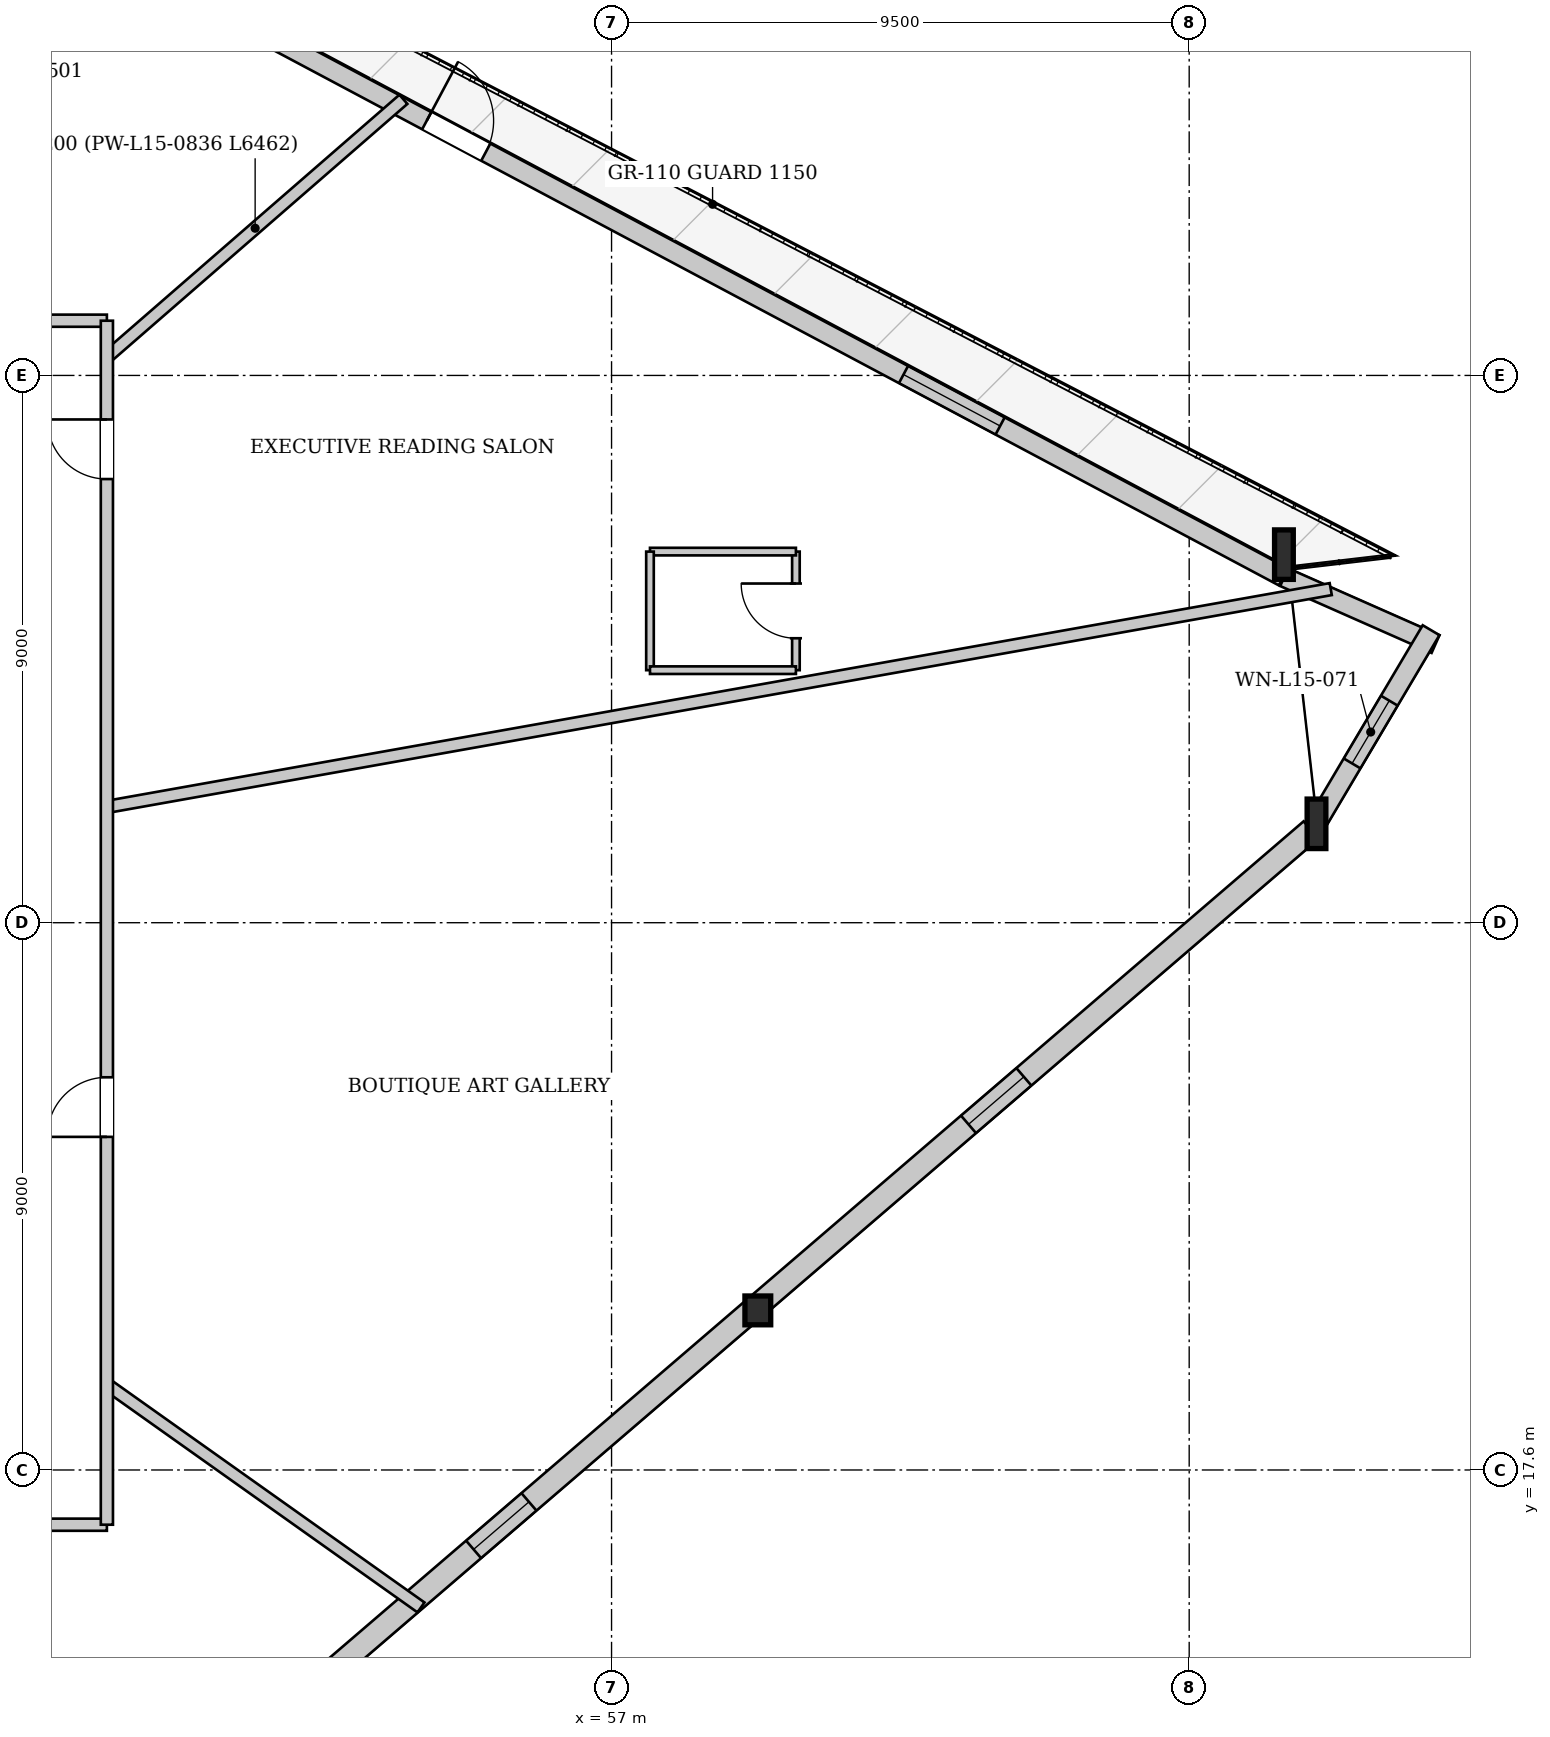
"""IFC4 building model, lengths in metres.
Left out: names, types, materials, properties, quantities, classifications, styles, units other than length and angle.
Written with IfcOpenShell. Run it as: python <this file> out.ifc"""

import sys

from ifc_helpers import new_model, si_unit, direction, frame, frame_2d, origin, origin_2d, place, context, subcontext, project, spatial, rectangle, i_section, extrude, source, transform, mapped, element, fill, save


model = new_model("IFC4")
c1 = context("Model", 3, precision=1e-05, world=origin(), true_north=direction((0.0, 1.0)))
c2 = subcontext(c1, "Body", "Model", "MODEL_VIEW")
j1 = project(units=[si_unit("LENGTHUNIT", "METRE"), si_unit("PLANEANGLEUNIT", "RADIAN")], contexts=[c1])
p1 = place(None, origin())
s1 = spatial("IfcSite", under=j1, at=p1, CompositionType="ELEMENT")
p2 = place(p1, origin())
s2 = spatial("IfcBuilding", under=s1, at=p2, CompositionType="ELEMENT")
p3 = place(p2, frame((0.0, 0.0, 61.25)))
s3 = spatial("IfcBuildingStorey", under=s2, at=p3, CompositionType="ELEMENT", Elevation=61.25)
m1 = source(origin(), c2, "Body", "SweptSolid", [
    extrude(i_section(OverallWidth=0.308, OverallDepth=0.814, WebThickness=0.021, FlangeThickness=0.04, at=origin_2d()), origin(), (0.0, 0.0, 1.0), 3.422),
])
p4 = place(p3, frame((68.63, 27.979, 0.0), z_axis=(-0.020977686151, 0.144346459468, 0.989304824775), x_axis=(-0.989604168183, -0.143817906795, 0.0)))
e1 = element("IfcColumn", 1, at=p4, inside=s3, PredefinedType="COLUMN", context=c2, shape_type="MappedRepresentation", body=[
    mapped(m1, transform((0.0, 0.0, 0.0), x_axis=(1.0, 0.0, 0.0), y_axis=(0.0, 1.0, 0.0), z_axis=(0.0, 0.0, 1.0), scale=1.0)),
])
m2 = source(origin(), c2, "Body", "SweptSolid", [
    extrude(i_section(OverallWidth=0.308, OverallDepth=0.814, WebThickness=0.021, FlangeThickness=0.04, at=origin_2d()), origin(), (0.0, 0.0, 1.0), 3.417),
])
p5 = place(p3, frame((68.126, 32.429, 0.0), z_axis=(-0.04000901182, 0.130958069047, 0.990580265867), x_axis=(-0.95636372102, -0.292178769106, 0.0)))
e2 = element("IfcColumn", 2, at=p5, inside=s3, PredefinedType="COLUMN", context=c2, shape_type="MappedRepresentation", body=[
    mapped(m2, transform((0.0, 0.0, 0.0), x_axis=(1.0, 0.0, 0.0), y_axis=(0.0, 1.0, 0.0), z_axis=(0.0, 0.0, 1.0), scale=1.0)),
])
m3 = source(origin(), c2, "Body", "SweptSolid", [
    extrude(i_section(OverallWidth=0.424, OverallDepth=0.474, WebThickness=0.043, FlangeThickness=0.068, at=origin_2d()), origin(), (0.0, 0.0, 1.0), 3.406),
])
p6 = place(p3, frame((59.38, 20.036, 0.0), z_axis=(0.015265903074, 0.110874892278, 0.993717117929), x_axis=(-0.990653978425, 0.136399028704, 0.0)))
e3 = element("IfcColumn", 3, at=p6, inside=s3, PredefinedType="COLUMN", context=c2, shape_type="MappedRepresentation", body=[
    mapped(m3, transform((0.0, 0.0, 0.0), x_axis=(1.0, 0.0, 0.0), y_axis=(0.0, 1.0, 0.0), z_axis=(0.0, 0.0, 1.0), scale=1.0)),
])
p7 = place(p3, frame((47.07, 43.457, 0.0), z_axis=(0.0, 0.0, 1.0), x_axis=(0.882722296468, -0.469895038618, 0.0)))
e4 = element("IfcWall", 4, at=p7, inside=s3, PredefinedType="SOLIDWALL", context=c2, shape_type="SweptSolid", body=[
    extrude(rectangle(XDim=23.769, YDim=0.32, at=frame_2d((11.885, 0.0))), origin(), (0.0, 0.0, 1.0), 2.592),
])
p8 = place(p7, frame((7.806, 0.0, 0.0)))
e5 = element("IfcOpeningElement", 5, at=p8, cuts=e4, PredefinedType="OPENING", context=c2, shape_type="SweptSolid", body=[
    extrude(rectangle(XDim=1.1, YDim=2.3, at=frame_2d((0.55, 1.15))), frame((0.0, 0.17, 0.0), z_axis=(0.0, -1.0, 0.0), x_axis=(1.0, 0.0, 0.0)), (0.0, 0.0, 1.0), 0.34),
])
p9 = place(p7, frame((16.689, 0.0, 0.272)))
e6 = element("IfcOpeningElement", 6, at=p9, cuts=e4, PredefinedType="OPENING", context=c2, shape_type="SweptSolid", body=[
    extrude(rectangle(XDim=1.8, YDim=2.2, at=frame_2d((0.9, 1.1))), frame((0.0, 0.17, 0.0), z_axis=(0.0, -1.0, 0.0), x_axis=(1.0, 0.0, 0.0)), (0.0, 0.0, 1.0), 0.34),
])
p10 = place(p3, frame((68.062, 32.283, 0.0), z_axis=(0.0, 0.0, 1.0), x_axis=(0.914627210646, -0.404298238366, 0.0)))
e7 = element("IfcWall", 7, at=p10, inside=s3, PredefinedType="SOLIDWALL", context=c2, shape_type="SweptSolid", body=[
    extrude(rectangle(XDim=2.722, YDim=0.32, at=frame_2d((1.361, 0.0))), origin(), (0.0, 0.0, 1.0), 2.592),
])
p11 = place(p3, frame((70.478, 31.41, 0.0), z_axis=(0.0, 0.0, 1.0), x_axis=(-0.51006357361, -0.86013670476, 0.0)))
e8 = element("IfcWall", 8, at=p11, inside=s3, PredefinedType="SOLIDWALL", context=c2, shape_type="SweptSolid", body=[
    extrude(rectangle(XDim=3.894, YDim=0.32, at=frame_2d((1.947, 0.0))), origin(), (0.0, 0.0, 1.0), 2.592),
])
p12 = place(p11, frame((1.347, 0.0, 0.65)))
e9 = element("IfcOpeningElement", 9, at=p12, cuts=e8, PredefinedType="OPENING", context=c2, shape_type="SweptSolid", body=[
    extrude(rectangle(XDim=1.2, YDim=1.5, at=frame_2d((0.6, 0.75))), frame((0.0, 0.17, 0.0), z_axis=(0.0, -1.0, 0.0), x_axis=(1.0, 0.0, 0.0)), (0.0, 0.0, 1.0), 0.34),
])
p13 = place(p3, frame((68.506, 28.123, 0.0), z_axis=(0.0, 0.0, 1.0), x_axis=(-0.758642837259, -0.651506750139, 0.0)))
e10 = element("IfcWall", 10, at=p13, inside=s3, PredefinedType="SOLIDWALL", context=c2, shape_type="SweptSolid", body=[
    extrude(rectangle(XDim=24.385, YDim=0.38, at=frame_2d((12.193, 0.0))), origin(), (0.0, 0.0, 1.0), 2.592),
])
p14 = place(p13, frame((6.228, 0.0, 0.65)))
e11 = element("IfcOpeningElement", 11, at=p14, cuts=e10, PredefinedType="OPENING", context=c2, shape_type="SweptSolid", body=[
    extrude(rectangle(XDim=1.2, YDim=1.5, at=frame_2d((0.6, 0.75))), frame((0.0, 0.2, 0.0), z_axis=(0.0, -1.0, 0.0), x_axis=(1.0, 0.0, 0.0)), (0.0, 0.0, 1.0), 0.4),
])
p15 = place(p13, frame((16.957, 0.0, 0.65)))
e12 = element("IfcOpeningElement", 12, at=p15, cuts=e10, PredefinedType="OPENING", context=c2, shape_type="SweptSolid", body=[
    extrude(rectangle(XDim=1.2, YDim=1.5, at=frame_2d((0.6, 0.75))), frame((0.0, 0.2, 0.0), z_axis=(0.0, -1.0, 0.0), x_axis=(1.0, 0.0, 0.0)), (0.0, 0.0, 1.0), 0.4),
])
p16 = place(p3, frame((48.7, 35.901, 0.0), z_axis=(0.0, 0.0, 1.0), x_axis=(0.754728336298, 0.656037451972, 0.0)))
e13 = element("IfcWall", 13, at=p16, inside=s3, PredefinedType="PARTITIONING", context=c2, shape_type="SweptSolid", body=[
    extrude(rectangle(XDim=6.461, YDim=0.2, at=frame_2d((3.231, 0.0))), origin(), (0.0, 0.0, 1.0), 3.3),
])
p17 = place(p3, frame((48.7, 19.006, 0.0), z_axis=(0.0, 0.0, 1.0), x_axis=(0.815508318328, -0.578745352239, 0.0)))
e14 = element("IfcWall", 14, at=p17, inside=s3, PredefinedType="PARTITIONING", context=c2, shape_type="SweptSolid", body=[
    extrude(rectangle(XDim=6.334, YDim=0.2, at=frame_2d((3.167, 0.0))), origin(), (0.0, 0.0, 1.0), 3.3),
])
p18 = place(p3, frame((48.7, 28.504, 0.0), z_axis=(0.0, 0.0, 1.0), x_axis=(0.984531028139, 0.175210315425, 0.0)))
e15 = element("IfcWall", 15, at=p18, inside=s3, PredefinedType="PARTITIONING", context=c2, shape_type="SweptSolid", body=[
    extrude(rectangle(XDim=20.444, YDim=0.2, at=frame_2d((10.222, 0.0))), origin(), (0.0, 0.0, 1.0), 3.3),
])
p19 = place(p3, frame((60.032, 30.753, 0.0), z_axis=(0.0, 0.0, 1.0), x_axis=(0.0, 1.0, 0.0)))
e16 = element("IfcWall", 16, at=p19, inside=s3, PredefinedType="PARTITIONING", context=c2, shape_type="SweptSolid", body=[
    extrude(rectangle(XDim=1.95, YDim=0.125, at=frame_2d((0.975, 0.0))), origin(), (0.0, 0.0, 1.0), 3.3),
])
p20 = place(p19, frame((0.525, 0.0, 0.0)))
e17 = element("IfcOpeningElement", 17, at=p20, cuts=e16, PredefinedType="OPENING", context=c2, shape_type="SweptSolid", body=[
    extrude(rectangle(XDim=0.9, YDim=2.1, at=frame_2d((0.45, 1.05))), frame((0.0, 0.073, 0.0), z_axis=(0.0, -1.0, 0.0), x_axis=(1.0, 0.0, 0.0)), (0.0, 0.0, 1.0), 0.145),
])
p21 = place(p3, frame((60.032, 32.703, 0.0), z_axis=(0.0, 0.0, 1.0), x_axis=(-1.0, 0.0, 0.0)))
e18 = element("IfcWall", 18, at=p21, inside=s3, PredefinedType="PARTITIONING", context=c2, shape_type="SweptSolid", body=[
    extrude(rectangle(XDim=2.4, YDim=0.125, at=frame_2d((1.2, 0.0))), origin(), (0.0, 0.0, 1.0), 3.3),
])
p22 = place(p3, frame((57.632, 32.703, 0.0), z_axis=(0.0, 0.0, 1.0), x_axis=(0.0, -1.0, 0.0)))
e19 = element("IfcWall", 19, at=p22, inside=s3, PredefinedType="PARTITIONING", context=c2, shape_type="SweptSolid", body=[
    extrude(rectangle(XDim=1.95, YDim=0.125, at=frame_2d((0.975, 0.0))), origin(), (0.0, 0.0, 1.0), 3.3),
])
p23 = place(p3, frame((57.632, 30.753, 0.0), z_axis=(0.0, 0.0, 1.0), x_axis=(1.0, 0.0, 0.0)))
e20 = element("IfcWall", 20, at=p23, inside=s3, PredefinedType="PARTITIONING", context=c2, shape_type="SweptSolid", body=[
    extrude(rectangle(XDim=2.4, YDim=0.125, at=frame_2d((1.2, 0.0))), origin(), (0.0, 0.0, 1.0), 2.795),
])
p24 = place(p3, frame((27.3, 16.7, 0.0), z_axis=(0.0, 0.0, 1.0), x_axis=(1.0, 0.0, 0.0)))
e21 = element("IfcWall", 21, at=p24, inside=s3, PredefinedType="PARTITIONING", context=c2, shape_type="SweptSolid", body=[
    extrude(rectangle(XDim=21.4, YDim=0.2, at=frame_2d((10.7, 0.0))), origin(), (0.0, 0.0, 1.0), 3.3),
])
p25 = place(p24, frame((6.732, 0.0, 0.0)))
e22 = element("IfcOpeningElement", 22, at=p25, cuts=e21, PredefinedType="OPENING", context=c2, shape_type="SweptSolid", body=[
    extrude(rectangle(XDim=0.98, YDim=2.15, at=frame_2d((0.49, 1.075))), frame((0.0, 0.11, 0.0), z_axis=(0.0, -1.0, 0.0), x_axis=(1.0, 0.0, 0.0)), (0.0, 0.0, 1.0), 0.22),
])
p26 = place(p24, frame((17.714, 0.0, 0.0)))
e23 = element("IfcOpeningElement", 23, at=p26, cuts=e21, PredefinedType="OPENING", context=c2, shape_type="SweptSolid", body=[
    extrude(rectangle(XDim=0.98, YDim=2.15, at=frame_2d((0.49, 1.075))), frame((0.0, 0.11, 0.0), z_axis=(0.0, -1.0, 0.0), x_axis=(1.0, 0.0, 0.0)), (0.0, 0.0, 1.0), 0.22),
])
p27 = place(p3, frame((27.3, 36.5, 0.0), z_axis=(0.0, 0.0, 1.0), x_axis=(1.0, 0.0, 0.0)))
e24 = element("IfcWall", 24, at=p27, inside=s3, PredefinedType="PARTITIONING", context=c2, shape_type="SweptSolid", body=[
    extrude(rectangle(XDim=21.4, YDim=0.2, at=frame_2d((10.7, 0.0))), origin(), (0.0, 0.0, 1.0), 3.3),
])
p28 = place(p27, frame((19.414, 0.0, 0.0)))
e25 = element("IfcOpeningElement", 25, at=p28, cuts=e24, PredefinedType="OPENING", context=c2, shape_type="SweptSolid", body=[
    extrude(rectangle(XDim=0.98, YDim=2.15, at=frame_2d((0.49, 1.075))), frame((0.0, 0.11, 0.0), z_axis=(0.0, -1.0, 0.0), x_axis=(1.0, 0.0, 0.0)), (0.0, 0.0, 1.0), 0.22),
])
p29 = place(p27, frame((6.682, 0.0, 0.0)))
e26 = element("IfcOpeningElement", 26, at=p29, cuts=e24, PredefinedType="OPENING", context=c2, shape_type="SweptSolid", body=[
    extrude(rectangle(XDim=0.98, YDim=2.15, at=frame_2d((0.49, 1.075))), frame((0.0, 0.11, 0.0), z_axis=(0.0, -1.0, 0.0), x_axis=(1.0, 0.0, 0.0)), (0.0, 0.0, 1.0), 0.22),
])
p30 = place(p3, frame((48.7, 16.7, 0.0), z_axis=(0.0, 0.0, 1.0), x_axis=(0.0, 1.0, 0.0)))
e27 = element("IfcWall", 27, at=p30, inside=s3, PredefinedType="PARTITIONING", context=c2, shape_type="SweptSolid", body=[
    extrude(rectangle(XDim=19.8, YDim=0.2, at=frame_2d((9.9, 0.0))), origin(), (0.0, 0.0, 1.0), 3.3),
])
p31 = place(p30, frame((6.378, 0.0, 0.0)))
e28 = element("IfcOpeningElement", 28, at=p31, cuts=e27, PredefinedType="OPENING", context=c2, shape_type="SweptSolid", body=[
    extrude(rectangle(XDim=0.98, YDim=2.15, at=frame_2d((0.49, 1.075))), frame((0.0, 0.11, 0.0), z_axis=(0.0, -1.0, 0.0), x_axis=(1.0, 0.0, 0.0)), (0.0, 0.0, 1.0), 0.22),
])
p32 = place(p30, frame((17.196, 0.0, 0.0)))
e29 = element("IfcOpeningElement", 29, at=p32, cuts=e27, PredefinedType="OPENING", context=c2, shape_type="SweptSolid", body=[
    extrude(rectangle(XDim=0.98, YDim=2.15, at=frame_2d((0.49, 1.075))), frame((0.0, 0.11, 0.0), z_axis=(0.0, -1.0, 0.0), x_axis=(1.0, 0.0, 0.0)), (0.0, 0.0, 1.0), 0.22),
])
m4 = source(origin(), c2, "Body", "SweptSolid", [
    extrude(rectangle(XDim=1.1, YDim=2.3, at=frame_2d((0.55, 1.15))), frame((0.0, 0.025, 0.0), z_axis=(0.0, -1.0, 0.0), x_axis=(1.0, 0.0, 0.0)), (0.0, 0.0, 1.0), 0.05),
])
p33 = place(p8, origin())
e30 = element("IfcDoor", 30, at=p33, inside=s3, OperationType="SINGLE_SWING_LEFT", PredefinedType="DOOR", context=c2, shape_type="MappedRepresentation", body=[
    mapped(m4, transform((0.0, 0.0, 0.0), x_axis=(1.0, 0.0, 0.0), y_axis=(0.0, 1.0, 0.0), z_axis=(0.0, 0.0, 1.0), scale=1.0)),
])
fill(e5, e30)
m5 = source(origin(), c2, "Body", "SweptSolid", [
    extrude(rectangle(XDim=1.8, YDim=2.2, at=frame_2d((0.9, 1.1))), frame((0.0, 0.03, 0.0), z_axis=(0.0, -1.0, 0.0), x_axis=(1.0, 0.0, 0.0)), (0.0, 0.0, 1.0), 0.06),
])
p34 = place(p9, origin())
e31 = element("IfcWindow", 31, at=p34, inside=s3, PartitioningType="SINGLE_PANEL", PredefinedType="WINDOW", context=c2, shape_type="MappedRepresentation", body=[
    mapped(m5, transform((0.0, 0.0, 0.0), x_axis=(1.0, 0.0, 0.0), y_axis=(0.0, 1.0, 0.0), z_axis=(0.0, 0.0, 1.0), scale=1.0)),
])
fill(e6, e31)
m6 = source(origin(), c2, "Body", "SweptSolid", [
    extrude(rectangle(XDim=1.2, YDim=1.5, at=frame_2d((0.6, 0.75))), frame((0.0, 0.03, 0.0), z_axis=(0.0, -1.0, 0.0), x_axis=(1.0, 0.0, 0.0)), (0.0, 0.0, 1.0), 0.06),
])
p35 = place(p12, origin())
e32 = element("IfcWindow", 32, at=p35, inside=s3, PartitioningType="SINGLE_PANEL", PredefinedType="WINDOW", context=c2, shape_type="MappedRepresentation", body=[
    mapped(m6, transform((0.0, 0.0, 0.0), x_axis=(1.0, 0.0, 0.0), y_axis=(0.0, 1.0, 0.0), z_axis=(0.0, 0.0, 1.0), scale=1.0)),
])
fill(e9, e32)
p36 = place(p14, origin())
e33 = element("IfcWindow", 33, at=p36, inside=s3, PartitioningType="SINGLE_PANEL", PredefinedType="WINDOW", context=c2, shape_type="MappedRepresentation", body=[
    mapped(m6, transform((0.0, 0.0, 0.0), x_axis=(1.0, 0.0, 0.0), y_axis=(0.0, 1.0, 0.0), z_axis=(0.0, 0.0, 1.0), scale=1.0)),
])
fill(e11, e33)
p37 = place(p15, origin())
e34 = element("IfcWindow", 34, at=p37, inside=s3, PartitioningType="SINGLE_PANEL", PredefinedType="WINDOW", context=c2, shape_type="MappedRepresentation", body=[
    mapped(m6, transform((0.0, 0.0, 0.0), x_axis=(1.0, 0.0, 0.0), y_axis=(0.0, 1.0, 0.0), z_axis=(0.0, 0.0, 1.0), scale=1.0)),
])
fill(e12, e34)
m7 = source(origin(), c2, "Body", "SweptSolid", [
    extrude(rectangle(XDim=0.9, YDim=2.1, at=frame_2d((0.45, 1.05))), frame((0.0, 0.025, 0.0), z_axis=(0.0, -1.0, 0.0), x_axis=(1.0, 0.0, 0.0)), (0.0, 0.0, 1.0), 0.05),
])
p38 = place(p20, origin())
e35 = element("IfcDoor", 35, at=p38, inside=s3, OperationType="SINGLE_SWING_RIGHT", PredefinedType="DOOR", context=c2, shape_type="MappedRepresentation", body=[
    mapped(m7, transform((0.0, 0.0, 0.0), x_axis=(1.0, 0.0, 0.0), y_axis=(0.0, 1.0, 0.0), z_axis=(0.0, 0.0, 1.0), scale=1.0)),
])
fill(e17, e35)
m8 = source(origin(), c2, "Body", "SweptSolid", [
    extrude(rectangle(XDim=0.98, YDim=2.15, at=frame_2d((0.49, 1.075))), frame((0.0, 0.025, 0.0), z_axis=(0.0, -1.0, 0.0), x_axis=(1.0, 0.0, 0.0)), (0.0, 0.0, 1.0), 0.05),
])
p39 = place(p31, origin())
e36 = element("IfcDoor", 36, at=p39, inside=s3, OperationType="SINGLE_SWING_LEFT", PredefinedType="DOOR", context=c2, shape_type="MappedRepresentation", body=[
    mapped(m8, transform((0.0, 0.0, 0.0), x_axis=(1.0, 0.0, 0.0), y_axis=(0.0, 1.0, 0.0), z_axis=(0.0, 0.0, 1.0), scale=1.0)),
])
fill(e28, e36)
p40 = place(p32, origin())
e37 = element("IfcDoor", 37, at=p40, inside=s3, OperationType="SINGLE_SWING_RIGHT", PredefinedType="DOOR", context=c2, shape_type="MappedRepresentation", body=[
    mapped(m8, transform((0.0, 0.0, 0.0), x_axis=(1.0, 0.0, 0.0), y_axis=(0.0, 1.0, 0.0), z_axis=(0.0, 0.0, 1.0), scale=1.0)),
])
fill(e29, e37)
save(model, sys.argv[1])
